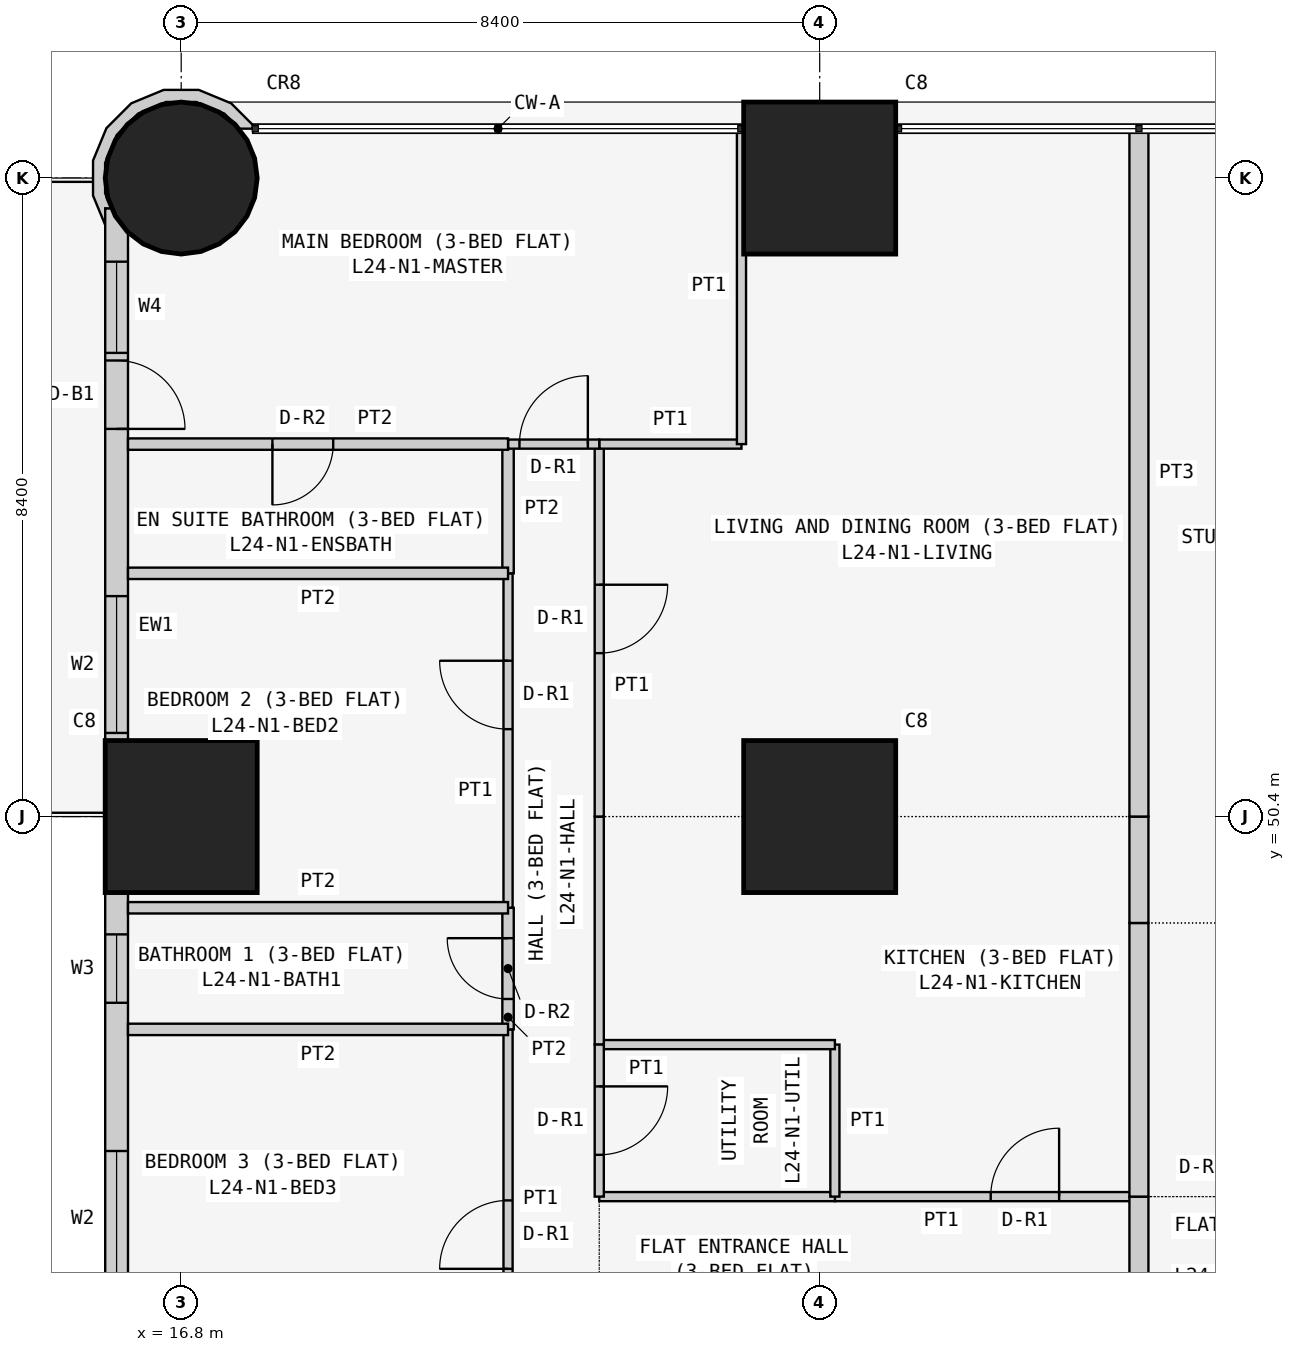
"""IFC4 building model, lengths in metres.
Left out: names, types, materials, properties, quantities, classifications, styles, units other than length and angle.
Written with IfcOpenShell. Run it as: python <this file> out.ifc"""

import sys

from ifc_helpers import new_model, si_unit, direction, frame, frame_2d, origin, origin_2d, place, context, subcontext, project, spatial, polyline, rectangle, circle, outline, extrude, element, fill, save


model = new_model("IFC4")
c1 = context("Model", 3, precision=1e-05, world=origin(), true_north=direction((0.0, 1.0)))
c2 = subcontext(c1, "Body", "Model", "MODEL_VIEW")
j1 = project(units=[si_unit("LENGTHUNIT", "METRE"), si_unit("PLANEANGLEUNIT", "RADIAN")], contexts=[c1])
p1 = place(None, origin())
s1 = spatial("IfcSite", under=j1, at=p1, CompositionType="ELEMENT")
p2 = place(p1, origin())
s2 = spatial("IfcBuilding", under=s1, at=p2, CompositionType="ELEMENT")
p3 = place(p2, frame((0.0, 0.0, 95.7)))
s3 = spatial("IfcBuildingStorey", under=s2, at=p3, CompositionType="ELEMENT", Elevation=95.7)
p4 = place(p3, frame((16.8, 50.4, 0.0), z_axis=(0.0, 0.0, 1.0), x_axis=(1.0, 0.0, 0.0)))
e1 = element("IfcColumn", 1, at=p4, inside=s3, PredefinedType="COLUMN", context=c2, shape_type="SweptSolid", body=[
    extrude(rectangle(XDim=2.0, YDim=2.0, at=origin_2d()), origin(), (0.0, 0.0, 1.0), 3.6),
])
p5 = place(p3, frame((16.8, 58.8, 0.0), z_axis=(0.0, 0.0, 1.0), x_axis=(1.0, 0.0, 0.0)))
e2 = element("IfcColumn", 2, at=p5, inside=s3, PredefinedType="COLUMN", context=c2, shape_type="SweptSolid", body=[
    extrude(circle(Radius=1.0, at=origin_2d()), origin(), (0.0, 0.0, 1.0), 3.6),
])
for number, where, z_axis, x_axis in (
    (3, (25.2, 50.4, 0.0), (0.0, 0.0, 1.0), (1.0, 0.0, 0.0)),
    (4, (25.2, 58.8, 0.0), (0.0, 0.0, 1.0), (1.0, 0.0, 0.0)),
):
    element("IfcColumn", number, at=place(p3, frame(where, z_axis=z_axis, x_axis=x_axis)), inside=s3, PredefinedType="COLUMN", context=c2, shape_type="SweptSolid", body=[
        extrude(rectangle(XDim=2.0, YDim=2.0, at=origin_2d()), origin(), (0.0, 0.0, 1.0), 3.6),
    ])
p6 = place(p3, frame((15.95, 58.4, 0.0), z_axis=(0.0, 0.0, 1.0), x_axis=(0.0, -1.0, 0.0)))
e5 = element("IfcWall", 5, at=p6, inside=s3, PredefinedType="SOLIDWALL", context=c2, shape_type="SweptSolid", body=[
    extrude(rectangle(XDim=15.7, YDim=0.3, at=frame_2d((7.85, 0.0))), origin(), (0.0, 0.0, 1.0), 3.45),
])
p7 = place(p6, frame((12.4, 0.0, 0.9)))
e6 = element("IfcOpeningElement", 6, at=p7, cuts=e5, PredefinedType="OPENING", context=c2, shape_type="SweptSolid", body=[
    extrude(rectangle(XDim=1.8, YDim=1.5, at=frame_2d((0.9, 0.75))), frame((0.0, 0.16, 0.0), z_axis=(0.0, -1.0, 0.0), x_axis=(1.0, 0.0, 0.0)), (0.0, 0.0, 1.0), 0.32),
])
p8 = place(p6, frame((9.55, 0.0, 1.5)))
e7 = element("IfcOpeningElement", 7, at=p8, cuts=e5, PredefinedType="OPENING", context=c2, shape_type="SweptSolid", body=[
    extrude(rectangle(XDim=0.9, YDim=0.7, at=frame_2d((0.45, 0.35))), frame((0.0, 0.16, 0.0), z_axis=(0.0, -1.0, 0.0), x_axis=(1.0, 0.0, 0.0)), (0.0, 0.0, 1.0), 0.32),
])
p9 = place(p6, frame((5.1, 0.0, 0.9)))
e8 = element("IfcOpeningElement", 8, at=p9, cuts=e5, PredefinedType="OPENING", context=c2, shape_type="SweptSolid", body=[
    extrude(rectangle(XDim=1.8, YDim=1.5, at=frame_2d((0.9, 0.75))), frame((0.0, 0.16, 0.0), z_axis=(0.0, -1.0, 0.0), x_axis=(1.0, 0.0, 0.0)), (0.0, 0.0, 1.0), 0.32),
])
p10 = place(p6, frame((2.0, 0.0, 0.0)))
e9 = element("IfcOpeningElement", 9, at=p10, cuts=e5, PredefinedType="OPENING", context=c2, shape_type="SweptSolid", body=[
    extrude(rectangle(XDim=0.9, YDim=2.4, at=frame_2d((0.45, 1.2))), frame((0.0, 0.16, 0.0), z_axis=(0.0, -1.0, 0.0), x_axis=(1.0, 0.0, 0.0)), (0.0, 0.0, 1.0), 0.32),
])
p11 = place(p6, frame((0.7, 0.0, 0.9)))
e10 = element("IfcOpeningElement", 10, at=p11, cuts=e5, PredefinedType="OPENING", context=c2, shape_type="SweptSolid", body=[
    extrude(rectangle(XDim=1.2, YDim=1.5, at=frame_2d((0.6, 0.75))), frame((0.0, 0.16, 0.0), z_axis=(0.0, -1.0, 0.0), x_axis=(1.0, 0.0, 0.0)), (0.0, 0.0, 1.0), 0.32),
])
p12 = place(p3, frame((17.668, 59.443, 0.0), z_axis=(0.0, 0.0, 1.0), x_axis=(-0.555974394895, 0.831199417842, 0.0)))
e11 = element("IfcWall", 11, at=p12, inside=s3, PredefinedType="SOLIDWALL", context=c2, shape_type="SweptSolid", body=[
    extrude(outline(polyline([(0.005, -0.093), (0.4, -0.014), (0.783, 0.242), (1.04, 0.626), (1.13, 1.078), (1.04, 1.531), (0.784, 1.915), (0.401, 2.171), (-0.009, 2.253), (0.171, 2.132), (0.113, 2.066), (0.339, 2.021), (0.67, 1.8), (0.891, 1.469), (0.968, 1.078), (0.89, 0.688), (0.669, 0.357), (0.338, 0.136), (0.062, 0.081), (-0.036, -0.066), (0.005, -0.093)])), origin(), (0.0, 0.0, 1.0), 3.45),
])
p13 = place(p3, frame((29.4, 45.4, 0.0), z_axis=(0.0, 0.0, 1.0), x_axis=(-1.0, 0.0, 0.0)))
e12 = element("IfcWall", 12, at=p13, inside=s3, PredefinedType="PARTITIONING", context=c2, shape_type="SweptSolid", body=[
    extrude(rectangle(XDim=4.0, YDim=0.12, at=frame_2d((2.0, 0.0))), origin(), (0.0, 0.0, 1.0), 3.45),
])
p14 = place(p13, frame((1.05, 0.0, 0.0)))
e13 = element("IfcOpeningElement", 13, at=p14, cuts=e12, PredefinedType="OPENING", context=c2, shape_type="SweptSolid", body=[
    extrude(rectangle(XDim=0.9, YDim=2.1, at=frame_2d((0.45, 1.05))), frame((0.0, 0.07, 0.0), z_axis=(0.0, -1.0, 0.0), x_axis=(1.0, 0.0, 0.0)), (0.0, 0.0, 1.0), 0.14),
])
p15 = place(p3, frame((25.4, 45.4, 0.0), z_axis=(0.0, 0.0, 1.0), x_axis=(-1.0, 0.0, 0.0)))
e14 = element("IfcWall", 14, at=p15, inside=s3, PredefinedType="PARTITIONING", context=c2, shape_type="SweptSolid", body=[
    extrude(rectangle(XDim=3.1, YDim=0.12, at=frame_2d((1.55, 0.0))), origin(), (0.0, 0.0, 1.0), 3.45),
])
p16 = place(p3, frame((29.4, 43.125, 0.0), z_axis=(0.0, 0.0, 1.0), x_axis=(0.0, 1.0, 0.0)))
e15 = element("IfcWall", 15, at=p16, inside=s3, PredefinedType="PARTITIONING", context=c2, shape_type="SweptSolid", body=[
    extrude(rectangle(XDim=2.275, YDim=0.25, at=frame_2d((1.137, 0.0))), origin(), (0.0, 0.0, 1.0), 2.848),
])
p17 = place(p3, frame((25.4, 45.4, 0.0), z_axis=(0.0, 0.0, 1.0), x_axis=(0.0, 1.0, 0.0)))
e16 = element("IfcWall", 16, at=p17, inside=s3, PredefinedType="PARTITIONING", context=c2, shape_type="SweptSolid", body=[
    extrude(rectangle(XDim=2.0, YDim=0.12, at=frame_2d((1.0, 0.0))), origin(), (0.0, 0.0, 1.0), 3.45),
])
p18 = place(p3, frame((25.4, 47.4, 0.0), z_axis=(0.0, 0.0, 1.0), x_axis=(-1.0, 0.0, 0.0)))
e17 = element("IfcWall", 17, at=p18, inside=s3, PredefinedType="PARTITIONING", context=c2, shape_type="SweptSolid", body=[
    extrude(rectangle(XDim=3.1, YDim=0.12, at=frame_2d((1.55, 0.0))), origin(), (0.0, 0.0, 1.0), 3.45),
])
p19 = place(p3, frame((22.3, 47.4, 0.0), z_axis=(0.0, 0.0, 1.0), x_axis=(0.0, 1.0, 0.0)))
e18 = element("IfcWall", 18, at=p19, inside=s3, PredefinedType="PARTITIONING", context=c2, shape_type="SweptSolid", body=[
    extrude(rectangle(XDim=3.0, YDim=0.12, at=frame_2d((1.5, 0.0))), origin(), (0.0, 0.0, 1.0), 3.45),
])
p20 = place(p3, frame((29.4, 49.0, 0.0), z_axis=(0.0, 0.0, 1.0), x_axis=(0.0, -1.0, 0.0)))
e19 = element("IfcWall", 19, at=p20, inside=s3, PredefinedType="PARTITIONING", context=c2, shape_type="SweptSolid", body=[
    extrude(rectangle(XDim=3.6, YDim=0.25, at=frame_2d((1.8, 0.0))), origin(), (0.0, 0.0, 1.0), 2.848),
])
p21 = place(p3, frame((29.4, 50.4, 0.0), z_axis=(0.0, 0.0, 1.0), x_axis=(0.0, -1.0, 0.0)))
e20 = element("IfcWall", 20, at=p21, inside=s3, PredefinedType="PARTITIONING", context=c2, shape_type="SweptSolid", body=[
    extrude(rectangle(XDim=1.4, YDim=0.25, at=frame_2d((0.7, 0.0))), origin(), (0.0, 0.0, 1.0), 2.848),
])
p22 = place(p3, frame((22.3, 47.4, 0.0), z_axis=(0.0, 0.0, 1.0), x_axis=(0.0, -1.0, 0.0)))
e21 = element("IfcWall", 21, at=p22, inside=s3, PredefinedType="PARTITIONING", context=c2, shape_type="SweptSolid", body=[
    extrude(rectangle(XDim=2.0, YDim=0.12, at=frame_2d((1.0, 0.0))), origin(), (0.0, 0.0, 1.0), 3.45),
])
p23 = place(p22, frame((0.55, 0.0, 0.0)))
e22 = element("IfcOpeningElement", 22, at=p23, cuts=e21, PredefinedType="OPENING", context=c2, shape_type="SweptSolid", body=[
    extrude(rectangle(XDim=0.9, YDim=2.1, at=frame_2d((0.45, 1.05))), frame((0.0, 0.07, 0.0), z_axis=(0.0, -1.0, 0.0), x_axis=(1.0, 0.0, 0.0)), (0.0, 0.0, 1.0), 0.14),
])
p24 = place(p3, frame((22.3, 50.4, 0.0), z_axis=(0.0, 0.0, 1.0), x_axis=(0.0, 1.0, 0.0)))
e23 = element("IfcWall", 23, at=p24, inside=s3, PredefinedType="PARTITIONING", context=c2, shape_type="SweptSolid", body=[
    extrude(rectangle(XDim=4.9, YDim=0.12, at=frame_2d((2.45, 0.0))), origin(), (0.0, 0.0, 1.0), 3.45),
])
p25 = place(p24, frame((2.15, 0.0, 0.0)))
e24 = element("IfcOpeningElement", 24, at=p25, cuts=e23, PredefinedType="OPENING", context=c2, shape_type="SweptSolid", body=[
    extrude(rectangle(XDim=0.9, YDim=2.1, at=frame_2d((0.45, 1.05))), frame((0.0, 0.07, 0.0), z_axis=(0.0, -1.0, 0.0), x_axis=(1.0, 0.0, 0.0)), (0.0, 0.0, 1.0), 0.14),
])
p26 = place(p3, frame((22.3, 55.3, 0.0), z_axis=(0.0, 0.0, 1.0), x_axis=(1.0, 0.0, 0.0)))
e25 = element("IfcWall", 25, at=p26, inside=s3, PredefinedType="PARTITIONING", context=c2, shape_type="SweptSolid", body=[
    extrude(rectangle(XDim=1.871, YDim=0.12, at=frame_2d((0.936, 0.0))), origin(), (0.0, 0.0, 1.0), 3.45),
])
p27 = place(p3, frame((24.171, 55.3, 0.0), z_axis=(0.0, 0.0, 1.0), x_axis=(0.0, 1.0, 0.0)))
e26 = element("IfcWall", 26, at=p27, inside=s3, PredefinedType="PARTITIONING", context=c2, shape_type="SweptSolid", body=[
    extrude(rectangle(XDim=4.15, YDim=0.12, at=frame_2d((2.075, 0.0))), origin(), (0.0, 0.0, 1.0), 3.45),
])
p28 = place(p3, frame((29.4, 59.45, 0.0), z_axis=(0.0, 0.0, 1.0), x_axis=(0.0, -1.0, 0.0)))
e27 = element("IfcWall", 27, at=p28, inside=s3, PredefinedType="PARTITIONING", context=c2, shape_type="SweptSolid", body=[
    extrude(rectangle(XDim=9.05, YDim=0.25, at=frame_2d((4.525, 0.0))), origin(), (0.0, 0.0, 1.0), 2.848),
])
p29 = place(p3, frame((21.1, 47.6, 0.0), z_axis=(0.0, 0.0, 1.0), x_axis=(0.0, -1.0, 0.0)))
e28 = element("IfcWall", 28, at=p29, inside=s3, PredefinedType="PARTITIONING", context=c2, shape_type="SweptSolid", body=[
    extrude(rectangle(XDim=4.475, YDim=0.12, at=frame_2d((2.238, 0.0))), origin(), (0.0, 0.0, 1.0), 3.45),
])
p30 = place(p29, frame((2.25, 0.0, 0.0)))
e29 = element("IfcOpeningElement", 29, at=p30, cuts=e28, PredefinedType="OPENING", context=c2, shape_type="SweptSolid", body=[
    extrude(rectangle(XDim=0.9, YDim=2.1, at=frame_2d((0.45, 1.05))), frame((0.0, 0.07, 0.0), z_axis=(0.0, -1.0, 0.0), x_axis=(1.0, 0.0, 0.0)), (0.0, 0.0, 1.0), 0.14),
])
p31 = place(p3, frame((21.1, 49.2, 0.0), z_axis=(0.0, 0.0, 1.0), x_axis=(0.0, -1.0, 0.0)))
e30 = element("IfcWall", 30, at=p31, inside=s3, PredefinedType="PARTITIONING", context=c2, shape_type="SweptSolid", body=[
    extrude(rectangle(XDim=1.6, YDim=0.15, at=frame_2d((0.8, 0.0))), origin(), (0.0, 0.0, 1.0), 3.45),
])
p32 = place(p31, frame((0.4, 0.0, 0.0)))
e31 = element("IfcOpeningElement", 31, at=p32, cuts=e30, PredefinedType="OPENING", context=c2, shape_type="SweptSolid", body=[
    extrude(rectangle(XDim=0.8, YDim=2.1, at=frame_2d((0.4, 1.05))), frame((0.0, 0.085, 0.0), z_axis=(0.0, -1.0, 0.0), x_axis=(1.0, 0.0, 0.0)), (0.0, 0.0, 1.0), 0.17),
])
p33 = place(p3, frame((21.1, 53.6, 0.0), z_axis=(0.0, 0.0, 1.0), x_axis=(0.0, -1.0, 0.0)))
e32 = element("IfcWall", 32, at=p33, inside=s3, PredefinedType="PARTITIONING", context=c2, shape_type="SweptSolid", body=[
    extrude(rectangle(XDim=4.4, YDim=0.12, at=frame_2d((2.2, 0.0))), origin(), (0.0, 0.0, 1.0), 3.45),
])
p34 = place(p33, frame((1.15, 0.0, 0.0)))
e33 = element("IfcOpeningElement", 33, at=p34, cuts=e32, PredefinedType="OPENING", context=c2, shape_type="SweptSolid", body=[
    extrude(rectangle(XDim=0.9, YDim=2.1, at=frame_2d((0.45, 1.05))), frame((0.0, 0.07, 0.0), z_axis=(0.0, -1.0, 0.0), x_axis=(1.0, 0.0, 0.0)), (0.0, 0.0, 1.0), 0.14),
])
p35 = place(p3, frame((21.1, 55.3, 0.0), z_axis=(0.0, 0.0, 1.0), x_axis=(0.0, -1.0, 0.0)))
e34 = element("IfcWall", 34, at=p35, inside=s3, PredefinedType="PARTITIONING", context=c2, shape_type="SweptSolid", body=[
    extrude(rectangle(XDim=1.7, YDim=0.15, at=frame_2d((0.85, 0.0))), origin(), (0.0, 0.0, 1.0), 3.45),
])
p36 = place(p3, frame((22.3, 55.3, 0.0), z_axis=(0.0, 0.0, 1.0), x_axis=(-1.0, 0.0, 0.0)))
e35 = element("IfcWall", 35, at=p36, inside=s3, PredefinedType="PARTITIONING", context=c2, shape_type="SweptSolid", body=[
    extrude(rectangle(XDim=1.2, YDim=0.12, at=frame_2d((0.6, 0.0))), origin(), (0.0, 0.0, 1.0), 3.45),
])
p37 = place(p36, frame((0.15, 0.0, 0.0)))
e36 = element("IfcOpeningElement", 36, at=p37, cuts=e35, PredefinedType="OPENING", context=c2, shape_type="SweptSolid", body=[
    extrude(rectangle(XDim=0.9, YDim=2.1, at=frame_2d((0.45, 1.05))), frame((0.0, 0.07, 0.0), z_axis=(0.0, -1.0, 0.0), x_axis=(1.0, 0.0, 0.0)), (0.0, 0.0, 1.0), 0.14),
])
for number, where, z_axis, x_axis in (
    (37, (21.1, 47.6, 0.0), (0.0, 0.0, 1.0), (-1.0, 0.0, 0.0)),
    (38, (21.1, 49.2, 0.0), (0.0, 0.0, 1.0), (-1.0, 0.0, 0.0)),
    (39, (21.1, 53.6, 0.0), (0.0, 0.0, 1.0), (-1.0, 0.0, 0.0)),
):
    element("IfcWall", number, at=place(p3, frame(where, z_axis=z_axis, x_axis=x_axis)), inside=s3, PredefinedType="PARTITIONING", context=c2, shape_type="SweptSolid", body=[
        extrude(rectangle(XDim=5.0, YDim=0.15, at=frame_2d((2.5, 0.0))), origin(), (0.0, 0.0, 1.0), 3.45),
    ])
p38 = place(p3, frame((21.1, 55.3, 0.0), z_axis=(0.0, 0.0, 1.0), x_axis=(-1.0, 0.0, 0.0)))
e40 = element("IfcWall", 40, at=p38, inside=s3, PredefinedType="PARTITIONING", context=c2, shape_type="SweptSolid", body=[
    extrude(rectangle(XDim=5.0, YDim=0.15, at=frame_2d((2.5, 0.0))), origin(), (0.0, 0.0, 1.0), 3.45),
])
p39 = place(p38, frame((2.3, 0.0, 0.0)))
e41 = element("IfcOpeningElement", 41, at=p39, cuts=e40, PredefinedType="OPENING", context=c2, shape_type="SweptSolid", body=[
    extrude(rectangle(XDim=0.8, YDim=2.1, at=frame_2d((0.4, 1.05))), frame((0.0, 0.085, 0.0), z_axis=(0.0, -1.0, 0.0), x_axis=(1.0, 0.0, 0.0)), (0.0, 0.0, 1.0), 0.17),
])
p40 = place(p7, origin())
e42 = element("IfcWindow", 42, at=p40, inside=s3, PartitioningType="SINGLE_PANEL", PredefinedType="WINDOW", context=c2, shape_type="SweptSolid", body=[
    extrude(rectangle(XDim=1.8, YDim=1.5, at=frame_2d((0.9, 0.75))), frame((0.0, 0.03, 0.0), z_axis=(0.0, -1.0, 0.0), x_axis=(1.0, 0.0, 0.0)), (0.0, 0.0, 1.0), 0.06),
])
fill(e6, e42)
p41 = place(p8, origin())
e43 = element("IfcWindow", 43, at=p41, inside=s3, PartitioningType="SINGLE_PANEL", PredefinedType="WINDOW", context=c2, shape_type="SweptSolid", body=[
    extrude(rectangle(XDim=0.9, YDim=0.7, at=frame_2d((0.45, 0.35))), frame((0.0, 0.03, 0.0), z_axis=(0.0, -1.0, 0.0), x_axis=(1.0, 0.0, 0.0)), (0.0, 0.0, 1.0), 0.06),
])
fill(e7, e43)
p42 = place(p9, origin())
e44 = element("IfcWindow", 44, at=p42, inside=s3, PartitioningType="SINGLE_PANEL", PredefinedType="WINDOW", context=c2, shape_type="SweptSolid", body=[
    extrude(rectangle(XDim=1.8, YDim=1.5, at=frame_2d((0.9, 0.75))), frame((0.0, 0.03, 0.0), z_axis=(0.0, -1.0, 0.0), x_axis=(1.0, 0.0, 0.0)), (0.0, 0.0, 1.0), 0.06),
])
fill(e8, e44)
p43 = place(p10, origin())
e45 = element("IfcDoor", 45, at=p43, inside=s3, OperationType="SINGLE_SWING_RIGHT", PredefinedType="DOOR", context=c2, shape_type="SweptSolid", body=[
    extrude(rectangle(XDim=0.9, YDim=2.4, at=frame_2d((0.45, 1.2))), frame((0.0, 0.025, 0.0), z_axis=(0.0, -1.0, 0.0), x_axis=(1.0, 0.0, 0.0)), (0.0, 0.0, 1.0), 0.05),
])
fill(e9, e45)
p44 = place(p11, origin())
e46 = element("IfcWindow", 46, at=p44, inside=s3, PartitioningType="SINGLE_PANEL", PredefinedType="WINDOW", context=c2, shape_type="SweptSolid", body=[
    extrude(rectangle(XDim=1.2, YDim=1.5, at=frame_2d((0.6, 0.75))), frame((0.0, 0.03, 0.0), z_axis=(0.0, -1.0, 0.0), x_axis=(1.0, 0.0, 0.0)), (0.0, 0.0, 1.0), 0.06),
])
fill(e10, e46)
p45 = place(p14, frame((0.9, 0.0, 0.0), z_axis=(0.0, 0.0, 1.0), x_axis=(-1.0, 0.0, 0.0)))
e47 = element("IfcDoor", 47, at=p45, inside=s3, OperationType="SINGLE_SWING_RIGHT", PredefinedType="DOOR", context=c2, shape_type="SweptSolid", body=[
    extrude(rectangle(XDim=0.9, YDim=2.1, at=frame_2d((0.45, 1.05))), frame((0.0, 0.025, 0.0), z_axis=(0.0, -1.0, 0.0), x_axis=(1.0, 0.0, 0.0)), (0.0, 0.0, 1.0), 0.05),
])
fill(e13, e47)
p46 = place(p23, origin())
e48 = element("IfcDoor", 48, at=p46, inside=s3, OperationType="SINGLE_SWING_LEFT", PredefinedType="DOOR", context=c2, shape_type="SweptSolid", body=[
    extrude(rectangle(XDim=0.9, YDim=2.1, at=frame_2d((0.45, 1.05))), frame((0.0, 0.025, 0.0), z_axis=(0.0, -1.0, 0.0), x_axis=(1.0, 0.0, 0.0)), (0.0, 0.0, 1.0), 0.05),
])
fill(e22, e48)
p47 = place(p25, frame((0.9, 0.0, 0.0), z_axis=(0.0, 0.0, 1.0), x_axis=(-1.0, 0.0, 0.0)))
e49 = element("IfcDoor", 49, at=p47, inside=s3, OperationType="SINGLE_SWING_LEFT", PredefinedType="DOOR", context=c2, shape_type="SweptSolid", body=[
    extrude(rectangle(XDim=0.9, YDim=2.1, at=frame_2d((0.45, 1.05))), frame((0.0, 0.025, 0.0), z_axis=(0.0, -1.0, 0.0), x_axis=(1.0, 0.0, 0.0)), (0.0, 0.0, 1.0), 0.05),
])
fill(e24, e49)
p48 = place(p30, frame((0.9, 0.0, 0.0), z_axis=(0.0, 0.0, 1.0), x_axis=(-1.0, 0.0, 0.0)))
e50 = element("IfcDoor", 50, at=p48, inside=s3, OperationType="SINGLE_SWING_LEFT", PredefinedType="DOOR", context=c2, shape_type="SweptSolid", body=[
    extrude(rectangle(XDim=0.9, YDim=2.1, at=frame_2d((0.45, 1.05))), frame((0.0, 0.025, 0.0), z_axis=(0.0, -1.0, 0.0), x_axis=(1.0, 0.0, 0.0)), (0.0, 0.0, 1.0), 0.05),
])
fill(e29, e50)
p49 = place(p32, frame((0.8, 0.0, 0.0), z_axis=(0.0, 0.0, 1.0), x_axis=(-1.0, 0.0, 0.0)))
e51 = element("IfcDoor", 51, at=p49, inside=s3, OperationType="SINGLE_SWING_RIGHT", PredefinedType="DOOR", context=c2, shape_type="SweptSolid", body=[
    extrude(rectangle(XDim=0.8, YDim=2.1, at=frame_2d((0.4, 1.05))), frame((0.0, 0.025, 0.0), z_axis=(0.0, -1.0, 0.0), x_axis=(1.0, 0.0, 0.0)), (0.0, 0.0, 1.0), 0.05),
])
fill(e31, e51)
p50 = place(p34, frame((0.9, 0.0, 0.0), z_axis=(0.0, 0.0, 1.0), x_axis=(-1.0, 0.0, 0.0)))
e52 = element("IfcDoor", 52, at=p50, inside=s3, OperationType="SINGLE_SWING_RIGHT", PredefinedType="DOOR", context=c2, shape_type="SweptSolid", body=[
    extrude(rectangle(XDim=0.9, YDim=2.1, at=frame_2d((0.45, 1.05))), frame((0.0, 0.025, 0.0), z_axis=(0.0, -1.0, 0.0), x_axis=(1.0, 0.0, 0.0)), (0.0, 0.0, 1.0), 0.05),
])
fill(e33, e52)
p51 = place(p37, frame((0.9, 0.0, 0.0), z_axis=(0.0, 0.0, 1.0), x_axis=(-1.0, 0.0, 0.0)))
e53 = element("IfcDoor", 53, at=p51, inside=s3, OperationType="SINGLE_SWING_RIGHT", PredefinedType="DOOR", context=c2, shape_type="SweptSolid", body=[
    extrude(rectangle(XDim=0.9, YDim=2.1, at=frame_2d((0.45, 1.05))), frame((0.0, 0.025, 0.0), z_axis=(0.0, -1.0, 0.0), x_axis=(1.0, 0.0, 0.0)), (0.0, 0.0, 1.0), 0.05),
])
fill(e36, e53)
p52 = place(p39, origin())
e54 = element("IfcDoor", 54, at=p52, inside=s3, OperationType="SINGLE_SWING_RIGHT", PredefinedType="DOOR", context=c2, shape_type="SweptSolid", body=[
    extrude(rectangle(XDim=0.8, YDim=2.1, at=frame_2d((0.4, 1.05))), frame((0.0, 0.025, 0.0), z_axis=(0.0, -1.0, 0.0), x_axis=(1.0, 0.0, 0.0)), (0.0, 0.0, 1.0), 0.05),
])
fill(e41, e54)
save(model, sys.argv[1])
